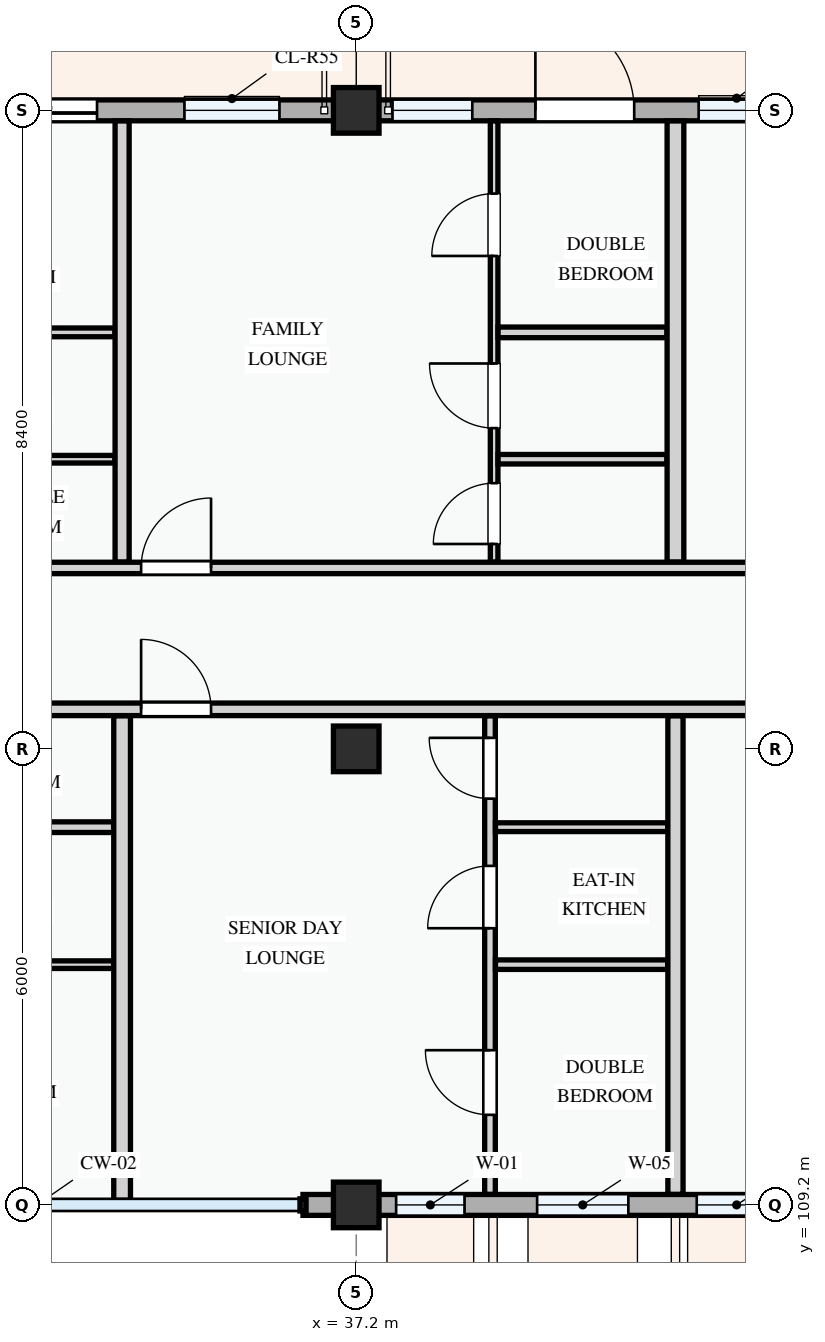
"""IFC4 building model, lengths in metres.
Left out: names, types, materials, properties, quantities, classifications, styles, units other than length and angle.
Written with IfcOpenShell. Run it as: python <this file> out.ifc"""

import sys

from ifc_helpers import new_model, si_unit, direction, frame, frame_2d, origin, origin_2d, place, context, subcontext, project, spatial, rectangle, extrude, element, fill, save


model = new_model("IFC4")
c1 = context("Model", 3, precision=1e-05, world=origin(), true_north=direction((0.0, 1.0)))
c2 = subcontext(c1, "Body", "Model", "MODEL_VIEW")
j1 = project(units=[si_unit("LENGTHUNIT", "METRE"), si_unit("PLANEANGLEUNIT", "RADIAN")], contexts=[c1])
p1 = place(None, origin())
s1 = spatial("IfcSite", under=j1, at=p1, CompositionType="ELEMENT")
p2 = place(p1, origin())
s2 = spatial("IfcBuilding", under=s1, at=p2, CompositionType="ELEMENT")
p3 = place(p2, frame((0.0, 0.0, 31.2)))
s3 = spatial("IfcBuildingStorey", under=s2, at=p3, CompositionType="ELEMENT", Elevation=31.2)
for number, where, z_axis, x_axis in (
    (1, (37.2, 109.2, 0.0), (0.0, 0.0, 1.0), (1.0, 0.0, 0.0)),
    (2, (37.2, 115.2, 0.0), (0.0, 0.0, 1.0), (1.0, 0.0, 0.0)),
    (3, (37.2, 123.6, 0.0), (0.0, 0.0, 1.0), (1.0, 0.0, 0.0)),
):
    element("IfcColumn", number, at=place(p3, frame(where, z_axis=z_axis, x_axis=x_axis)), inside=s3, PredefinedType="COLUMN", context=c2, shape_type="SweptSolid", body=[
        extrude(rectangle(XDim=0.6, YDim=0.6, at=origin_2d()), origin(), (0.0, 0.0, 1.0), 3.3),
    ])
p4 = place(p3, frame((36.5, 109.2, 0.0), z_axis=(0.0, 0.0, 1.0), x_axis=(1.0, 0.0, 0.0)))
e4 = element("IfcWall", 4, at=p4, inside=s3, PredefinedType="STANDARD", context=c2, shape_type="SweptSolid", body=[
    extrude(rectangle(XDim=0.7, YDim=0.275, at=frame_2d((0.35, 0.0))), origin(), (0.0, 0.0, 1.0), 2.375),
])
p5 = place(p3, frame((37.2, 109.2, 0.0), z_axis=(0.0, 0.0, 1.0), x_axis=(1.0, 0.0, 0.0)))
e5 = element("IfcWall", 5, at=p5, inside=s3, PredefinedType="STANDARD", context=c2, shape_type="SweptSolid", body=[
    extrude(rectangle(XDim=6.0, YDim=0.275, at=frame_2d((3.0, 0.0))), origin(), (0.0, 0.0, 1.0), 2.525),
])
p6 = place(p5, frame((0.525, 0.0, 0.78)))
e6 = element("IfcOpeningElement", 6, at=p6, cuts=e5, PredefinedType="OPENING", context=c2, shape_type="SweptSolid", body=[
    extrude(rectangle(XDim=0.9, YDim=1.2, at=frame_2d((0.45, 0.6))), frame((0.0, 0.147, 0.0), z_axis=(0.0, -1.0, 0.0), x_axis=(1.0, 0.0, 0.0)), (0.0, 0.0, 1.0), 0.295),
])
p7 = place(p5, frame((2.38, 0.0, 0.78)))
e7 = element("IfcOpeningElement", 7, at=p7, cuts=e5, PredefinedType="OPENING", context=c2, shape_type="SweptSolid", body=[
    extrude(rectangle(XDim=1.2, YDim=1.5, at=frame_2d((0.6, 0.75))), frame((0.0, 0.147, 0.0), z_axis=(0.0, -1.0, 0.0), x_axis=(1.0, 0.0, 0.0)), (0.0, 0.0, 1.0), 0.295),
])
p8 = place(p5, frame((4.48, 0.0, 0.78)))
e8 = element("IfcOpeningElement", 8, at=p8, cuts=e5, PredefinedType="OPENING", context=c2, shape_type="SweptSolid", body=[
    extrude(rectangle(XDim=1.05, YDim=1.2, at=frame_2d((0.525, 0.6))), frame((0.0, 0.147, 0.0), z_axis=(0.0, -1.0, 0.0), x_axis=(1.0, 0.0, 0.0)), (0.0, 0.0, 1.0), 0.295),
])
p9 = place(p3, frame((43.2, 123.6, 0.0), z_axis=(0.0, 0.0, 1.0), x_axis=(-1.0, 0.0, 0.0)))
e9 = element("IfcWall", 9, at=p9, inside=s3, PredefinedType="STANDARD", context=c2, shape_type="SweptSolid", body=[
    extrude(rectangle(XDim=6.0, YDim=0.275, at=frame_2d((3.0, 0.0))), origin(), (0.0, 0.0, 1.0), 2.525),
])
p10 = place(p9, frame((2.343, 0.0, 0.0)))
e10 = element("IfcOpeningElement", 10, at=p10, cuts=e9, PredefinedType="OPENING", context=c2, shape_type="SweptSolid", body=[
    extrude(rectangle(XDim=1.3, YDim=2.15, at=frame_2d((0.65, 1.075))), frame((0.0, 0.147, 0.0), z_axis=(0.0, -1.0, 0.0), x_axis=(1.0, 0.0, 0.0)), (0.0, 0.0, 1.0), 0.295),
])
p11 = place(p9, frame((0.495, 0.0, 0.78)))
e11 = element("IfcOpeningElement", 11, at=p11, cuts=e9, PredefinedType="OPENING", context=c2, shape_type="SweptSolid", body=[
    extrude(rectangle(XDim=1.0, YDim=1.25, at=frame_2d((0.5, 0.625))), frame((0.0, 0.147, 0.0), z_axis=(0.0, -1.0, 0.0), x_axis=(1.0, 0.0, 0.0)), (0.0, 0.0, 1.0), 0.295),
])
p12 = place(p9, frame((4.473, 0.0, 0.78)))
e12 = element("IfcOpeningElement", 12, at=p12, cuts=e9, PredefinedType="OPENING", context=c2, shape_type="SweptSolid", body=[
    extrude(rectangle(XDim=1.05, YDim=1.2, at=frame_2d((0.525, 0.6))), frame((0.0, 0.147, 0.0), z_axis=(0.0, -1.0, 0.0), x_axis=(1.0, 0.0, 0.0)), (0.0, 0.0, 1.0), 0.295),
])
p13 = place(p3, frame((37.2, 123.6, 0.0), z_axis=(0.0, 0.0, 1.0), x_axis=(-1.0, 0.0, 0.0)))
e13 = element("IfcWall", 13, at=p13, inside=s3, PredefinedType="STANDARD", context=c2, shape_type="SweptSolid", body=[
    extrude(rectangle(XDim=8.4, YDim=0.275, at=frame_2d((4.2, 0.0))), origin(), (0.0, 0.0, 1.0), 2.375),
])
p14 = place(p13, frame((3.41, 0.0, 0.0)))
e14 = element("IfcOpeningElement", 14, at=p14, cuts=e13, PredefinedType="OPENING", context=c2, shape_type="SweptSolid", body=[
    extrude(rectangle(XDim=1.4, YDim=2.2, at=frame_2d((0.7, 1.1))), frame((0.0, 0.147, 0.0), z_axis=(0.0, -1.0, 0.0), x_axis=(1.0, 0.0, 0.0)), (0.0, 0.0, 1.0), 0.295),
])
p15 = place(p13, frame((1.01, 0.0, 0.78)))
e15 = element("IfcOpeningElement", 15, at=p15, cuts=e13, PredefinedType="OPENING", context=c2, shape_type="SweptSolid", body=[
    extrude(rectangle(XDim=1.25, YDim=1.3, at=frame_2d((0.625, 0.65))), frame((0.0, 0.147, 0.0), z_axis=(0.0, -1.0, 0.0), x_axis=(1.0, 0.0, 0.0)), (0.0, 0.0, 1.0), 0.295),
])
p16 = place(p13, frame((5.227, 0.0, 0.78)))
e16 = element("IfcOpeningElement", 16, at=p16, cuts=e13, PredefinedType="OPENING", context=c2, shape_type="SweptSolid", body=[
    extrude(rectangle(XDim=1.05, YDim=1.2, at=frame_2d((0.525, 0.6))), frame((0.0, 0.147, 0.0), z_axis=(0.0, -1.0, 0.0), x_axis=(1.0, 0.0, 0.0)), (0.0, 0.0, 1.0), 0.295),
])
p17 = place(p13, frame((6.977, 0.0, 0.78)))
e17 = element("IfcOpeningElement", 17, at=p17, cuts=e13, PredefinedType="OPENING", context=c2, shape_type="SweptSolid", body=[
    extrude(rectangle(XDim=0.9, YDim=1.2, at=frame_2d((0.45, 0.6))), frame((0.0, 0.147, 0.0), z_axis=(0.0, -1.0, 0.0), x_axis=(1.0, 0.0, 0.0)), (0.0, 0.0, 1.0), 0.295),
])
p18 = place(p3, frame((30.594, 112.361, 0.0), z_axis=(0.0, 0.0, 1.0), x_axis=(1.0, 0.0, 0.0)))
e18 = element("IfcWall", 18, at=p18, inside=s3, PredefinedType="PARTITIONING", context=c2, shape_type="SweptSolid", body=[
    extrude(rectangle(XDim=3.414, YDim=0.1, at=frame_2d((1.707, 0.0))), origin(), (0.0, 0.0, 1.0), 3.0),
])
p19 = place(p3, frame((30.594, 114.17, 0.0), z_axis=(0.0, 0.0, 1.0), x_axis=(1.0, 0.0, 0.0)))
e19 = element("IfcWall", 19, at=p19, inside=s3, PredefinedType="PARTITIONING", context=c2, shape_type="SweptSolid", body=[
    extrude(rectangle(XDim=3.414, YDim=0.14, at=frame_2d((1.707, 0.0))), origin(), (0.0, 0.0, 1.0), 3.0),
])
p20 = place(p3, frame((30.62, 120.679, 0.0), z_axis=(0.0, 0.0, 1.0), x_axis=(1.0, 0.0, 0.0)))
e20 = element("IfcWall", 20, at=p20, inside=s3, PredefinedType="PARTITIONING", context=c2, shape_type="SweptSolid", body=[
    extrude(rectangle(XDim=3.405, YDim=0.115, at=frame_2d((1.703, 0.0))), origin(), (0.0, 0.0, 1.0), 3.0),
])
p21 = place(p3, frame((30.62, 119.01, 0.0), z_axis=(0.0, 0.0, 1.0), x_axis=(1.0, 0.0, 0.0)))
e21 = element("IfcWall", 21, at=p21, inside=s3, PredefinedType="PARTITIONING", context=c2, shape_type="SweptSolid", body=[
    extrude(rectangle(XDim=3.405, YDim=0.1, at=frame_2d((1.703, 0.0))), origin(), (0.0, 0.0, 1.0), 3.0),
])
p22 = place(p3, frame((38.96, 109.34, 0.0), z_axis=(0.0, 0.0, 1.0), x_axis=(0.0, 1.0, 0.0)))
e22 = element("IfcWall", 22, at=p22, inside=s3, PredefinedType="PARTITIONING", context=c2, shape_type="SweptSolid", body=[
    extrude(rectangle(XDim=6.296, YDim=0.14, at=frame_2d((3.148, 0.0))), origin(), (0.0, 0.0, 1.0), 3.0),
])
p23 = place(p22, frame((1.046, 0.0, 0.0)))
e23 = element("IfcOpeningElement", 23, at=p23, cuts=e22, PredefinedType="OPENING", context=c2, shape_type="SweptSolid", body=[
    extrude(rectangle(XDim=0.85, YDim=2.1, at=frame_2d((0.425, 1.05))), frame((0.0, 0.08, 0.0), z_axis=(0.0, -1.0, 0.0), x_axis=(1.0, 0.0, 0.0)), (0.0, 0.0, 1.0), 0.16),
])
p24 = place(p22, frame((3.501, 0.0, 0.0)))
e24 = element("IfcOpeningElement", 24, at=p24, cuts=e22, PredefinedType="OPENING", context=c2, shape_type="SweptSolid", body=[
    extrude(rectangle(XDim=0.82, YDim=2.08, at=frame_2d((0.41, 1.04))), frame((0.0, 0.08, 0.0), z_axis=(0.0, -1.0, 0.0), x_axis=(1.0, 0.0, 0.0)), (0.0, 0.0, 1.0), 0.16),
])
p25 = place(p22, frame((5.205, 0.0, 0.0)))
e25 = element("IfcOpeningElement", 25, at=p25, cuts=e22, PredefinedType="OPENING", context=c2, shape_type="SweptSolid", body=[
    extrude(rectangle(XDim=0.8, YDim=2.1, at=frame_2d((0.4, 1.05))), frame((0.0, 0.08, 0.0), z_axis=(0.0, -1.0, 0.0), x_axis=(1.0, 0.0, 0.0)), (0.0, 0.0, 1.0), 0.16),
])
p26 = place(p3, frame((39.032, 112.361, 0.0), z_axis=(0.0, 0.0, 1.0), x_axis=(1.0, 0.0, 0.0)))
e26 = element("IfcWall", 26, at=p26, inside=s3, PredefinedType="PARTITIONING", context=c2, shape_type="SweptSolid", body=[
    extrude(rectangle(XDim=2.266, YDim=0.125, at=frame_2d((1.133, 0.0))), origin(), (0.0, 0.0, 1.0), 3.0),
])
p27 = place(p3, frame((39.032, 114.17, 0.0), z_axis=(0.0, 0.0, 1.0), x_axis=(1.0, 0.0, 0.0)))
e27 = element("IfcWall", 27, at=p27, inside=s3, PredefinedType="PARTITIONING", context=c2, shape_type="SweptSolid", body=[
    extrude(rectangle(XDim=2.266, YDim=0.115, at=frame_2d((1.133, 0.0))), origin(), (0.0, 0.0, 1.0), 3.0),
])
p28 = place(p3, frame((39.014, 117.657, 0.0), z_axis=(0.0, 0.0, 1.0), x_axis=(0.0, 1.0, 0.0)))
e28 = element("IfcWall", 28, at=p28, inside=s3, PredefinedType="PARTITIONING", context=c2, shape_type="SweptSolid", body=[
    extrude(rectangle(XDim=5.803, YDim=0.1, at=frame_2d((2.902, 0.0))), origin(), (0.0, 0.0, 1.0), 3.0),
])
p29 = place(p28, frame((0.238, 0.0, 0.0)))
e29 = element("IfcOpeningElement", 29, at=p29, cuts=e28, PredefinedType="OPENING", context=c2, shape_type="SweptSolid", body=[
    extrude(rectangle(XDim=0.8, YDim=2.1, at=frame_2d((0.4, 1.05))), frame((0.0, 0.06, 0.0), z_axis=(0.0, -1.0, 0.0), x_axis=(1.0, 0.0, 0.0)), (0.0, 0.0, 1.0), 0.12),
])
p30 = place(p28, frame((1.763, 0.0, 0.0)))
e30 = element("IfcOpeningElement", 30, at=p30, cuts=e28, PredefinedType="OPENING", context=c2, shape_type="SweptSolid", body=[
    extrude(rectangle(XDim=0.85, YDim=2.1, at=frame_2d((0.425, 1.05))), frame((0.0, 0.06, 0.0), z_axis=(0.0, -1.0, 0.0), x_axis=(1.0, 0.0, 0.0)), (0.0, 0.0, 1.0), 0.12),
])
p31 = place(p28, frame((4.028, 0.0, 0.0)))
e31 = element("IfcOpeningElement", 31, at=p31, cuts=e28, PredefinedType="OPENING", context=c2, shape_type="SweptSolid", body=[
    extrude(rectangle(XDim=0.82, YDim=2.08, at=frame_2d((0.41, 1.04))), frame((0.0, 0.06, 0.0), z_axis=(0.0, -1.0, 0.0), x_axis=(1.0, 0.0, 0.0)), (0.0, 0.0, 1.0), 0.12),
])
p32 = place(p3, frame((39.066, 120.679, 0.0), z_axis=(0.0, 0.0, 1.0), x_axis=(1.0, 0.0, 0.0)))
e32 = element("IfcWall", 32, at=p32, inside=s3, PredefinedType="PARTITIONING", context=c2, shape_type="SweptSolid", body=[
    extrude(rectangle(XDim=2.222, YDim=0.14, at=frame_2d((1.111, 0.0))), origin(), (0.0, 0.0, 1.0), 3.0),
])
p33 = place(p3, frame((39.066, 119.01, 0.0), z_axis=(0.0, 0.0, 1.0), x_axis=(1.0, 0.0, 0.0)))
e33 = element("IfcWall", 33, at=p33, inside=s3, PredefinedType="PARTITIONING", context=c2, shape_type="SweptSolid", body=[
    extrude(rectangle(XDim=2.222, YDim=0.125, at=frame_2d((1.111, 0.0))), origin(), (0.0, 0.0, 1.0), 3.0),
])
p34 = place(p3, frame((34.12, 109.26, 0.0), z_axis=(0.0, 0.0, 1.0), x_axis=(0.0, 1.0, 0.0)))
e34 = element("IfcWall", 34, at=p34, inside=s3, PredefinedType="PARTITIONING", context=c2, shape_type="SweptSolid", body=[
    extrude(rectangle(XDim=6.375, YDim=0.22, at=frame_2d((3.188, 0.0))), origin(), (0.0, 0.0, 1.0), 3.0),
])
p35 = place(p3, frame((34.12, 117.657, 0.0), z_axis=(0.0, 0.0, 1.0), x_axis=(0.0, 1.0, 0.0)))
e35 = element("IfcWall", 35, at=p35, inside=s3, PredefinedType="PARTITIONING", context=c2, shape_type="SweptSolid", body=[
    extrude(rectangle(XDim=5.803, YDim=0.185, at=frame_2d((2.902, 0.0))), origin(), (0.0, 0.0, 1.0), 3.0),
])
p36 = place(p3, frame((41.4, 109.34, 0.0), z_axis=(0.0, 0.0, 1.0), x_axis=(0.0, 1.0, 0.0)))
e36 = element("IfcWall", 36, at=p36, inside=s3, PredefinedType="PARTITIONING", context=c2, shape_type="SweptSolid", body=[
    extrude(rectangle(XDim=6.296, YDim=0.2, at=frame_2d((3.148, 0.0))), origin(), (0.0, 0.0, 1.0), 3.0),
])
p37 = place(p3, frame((41.4, 117.657, 0.0), z_axis=(0.0, 0.0, 1.0), x_axis=(0.0, 1.0, 0.0)))
e37 = element("IfcWall", 37, at=p37, inside=s3, PredefinedType="PARTITIONING", context=c2, shape_type="SweptSolid", body=[
    extrude(rectangle(XDim=5.803, YDim=0.22, at=frame_2d((2.902, 0.0))), origin(), (0.0, 0.0, 1.0), 3.0),
])
p38 = place(p3, frame((25.15, 115.72, 0.0), z_axis=(0.0, 0.0, 1.0), x_axis=(1.0, 0.0, 0.0)))
e38 = element("IfcWall", 38, at=p38, inside=s3, PredefinedType="PARTITIONING", context=c2, shape_type="SweptSolid", body=[
    extrude(rectangle(XDim=26.311, YDim=0.165, at=frame_2d((13.155, 0.0))), origin(), (0.0, 0.0, 1.0), 3.0),
])
p39 = place(p38, frame((0.25, 0.0, 0.0)))
e39 = element("IfcOpeningElement", 39, at=p39, cuts=e38, PredefinedType="OPENING", context=c2, shape_type="SweptSolid", body=[
    extrude(rectangle(XDim=0.92, YDim=2.1, at=frame_2d((0.46, 1.05))), frame((0.0, 0.093, 0.0), z_axis=(0.0, -1.0, 0.0), x_axis=(1.0, 0.0, 0.0)), (0.0, 0.0, 1.0), 0.185),
])
p40 = place(p38, frame((9.22, 0.0, 0.0)))
e40 = element("IfcOpeningElement", 40, at=p40, cuts=e38, PredefinedType="OPENING", context=c2, shape_type="SweptSolid", body=[
    extrude(rectangle(XDim=0.92, YDim=2.1, at=frame_2d((0.46, 1.05))), frame((0.0, 0.093, 0.0), z_axis=(0.0, -1.0, 0.0), x_axis=(1.0, 0.0, 0.0)), (0.0, 0.0, 1.0), 0.185),
])
p41 = place(p38, frame((20.11, 0.0, 0.0)))
e41 = element("IfcOpeningElement", 41, at=p41, cuts=e38, PredefinedType="OPENING", context=c2, shape_type="SweptSolid", body=[
    extrude(rectangle(XDim=0.96, YDim=2.12, at=frame_2d((0.48, 1.06))), frame((0.0, 0.093, 0.0), z_axis=(0.0, -1.0, 0.0), x_axis=(1.0, 0.0, 0.0)), (0.0, 0.0, 1.0), 0.185),
])
p42 = place(p3, frame((22.66, 117.58, 0.0), z_axis=(0.0, 0.0, 1.0), x_axis=(1.0, 0.0, 0.0)))
e42 = element("IfcWall", 42, at=p42, inside=s3, PredefinedType="PARTITIONING", context=c2, shape_type="SweptSolid", body=[
    extrude(rectangle(XDim=28.88, YDim=0.15, at=frame_2d((14.44, 0.0))), origin(), (0.0, 0.0, 1.0), 3.0),
])
p43 = place(p42, frame((2.74, 0.0, 0.0)))
e43 = element("IfcOpeningElement", 43, at=p43, cuts=e42, PredefinedType="OPENING", context=c2, shape_type="SweptSolid", body=[
    extrude(rectangle(XDim=0.92, YDim=2.1, at=frame_2d((0.46, 1.05))), frame((0.0, 0.085, 0.0), z_axis=(0.0, -1.0, 0.0), x_axis=(1.0, 0.0, 0.0)), (0.0, 0.0, 1.0), 0.17),
])
p44 = place(p42, frame((11.71, 0.0, 0.0)))
e44 = element("IfcOpeningElement", 44, at=p44, cuts=e42, PredefinedType="OPENING", context=c2, shape_type="SweptSolid", body=[
    extrude(rectangle(XDim=0.92, YDim=2.1, at=frame_2d((0.46, 1.05))), frame((0.0, 0.085, 0.0), z_axis=(0.0, -1.0, 0.0), x_axis=(1.0, 0.0, 0.0)), (0.0, 0.0, 1.0), 0.17),
])
p45 = place(p42, frame((22.397, 0.0, 0.0)))
e45 = element("IfcOpeningElement", 45, at=p45, cuts=e42, PredefinedType="OPENING", context=c2, shape_type="SweptSolid", body=[
    extrude(rectangle(XDim=0.92, YDim=2.1, at=frame_2d((0.46, 1.05))), frame((0.0, 0.085, 0.0), z_axis=(0.0, -1.0, 0.0), x_axis=(1.0, 0.0, 0.0)), (0.0, 0.0, 1.0), 0.17),
])
p46 = place(p6, origin())
e46 = element("IfcWindow", 46, at=p46, inside=s3, PartitioningType="SINGLE_PANEL", PredefinedType="WINDOW", context=c2, shape_type="SweptSolid", body=[
    extrude(rectangle(XDim=0.9, YDim=1.2, at=frame_2d((0.45, 0.6))), frame((0.0, 0.03, 0.0), z_axis=(0.0, -1.0, 0.0), x_axis=(1.0, 0.0, 0.0)), (0.0, 0.0, 1.0), 0.06),
])
fill(e6, e46)
p47 = place(p7, origin())
e47 = element("IfcWindow", 47, at=p47, inside=s3, PartitioningType="SINGLE_PANEL", PredefinedType="WINDOW", context=c2, shape_type="SweptSolid", body=[
    extrude(rectangle(XDim=1.2, YDim=1.5, at=frame_2d((0.6, 0.75))), frame((0.0, 0.03, 0.0), z_axis=(0.0, -1.0, 0.0), x_axis=(1.0, 0.0, 0.0)), (0.0, 0.0, 1.0), 0.06),
])
fill(e7, e47)
p48 = place(p8, origin())
e48 = element("IfcWindow", 48, at=p48, inside=s3, PartitioningType="SINGLE_PANEL", PredefinedType="WINDOW", context=c2, shape_type="SweptSolid", body=[
    extrude(rectangle(XDim=1.05, YDim=1.2, at=frame_2d((0.525, 0.6))), frame((0.0, 0.03, 0.0), z_axis=(0.0, -1.0, 0.0), x_axis=(1.0, 0.0, 0.0)), (0.0, 0.0, 1.0), 0.06),
])
fill(e8, e48)
p49 = place(p10, frame((1.3, 0.0, 0.0), z_axis=(0.0, 0.0, 1.0), x_axis=(-1.0, 0.0, 0.0)))
e49 = element("IfcDoor", 49, at=p49, inside=s3, OperationType="SINGLE_SWING_LEFT", PredefinedType="DOOR", context=c2, shape_type="SweptSolid", body=[
    extrude(rectangle(XDim=1.3, YDim=2.15, at=frame_2d((0.65, 1.075))), frame((0.0, 0.025, 0.0), z_axis=(0.0, -1.0, 0.0), x_axis=(1.0, 0.0, 0.0)), (0.0, 0.0, 1.0), 0.05),
])
fill(e10, e49)
p50 = place(p11, origin())
e50 = element("IfcWindow", 50, at=p50, inside=s3, PartitioningType="SINGLE_PANEL", PredefinedType="WINDOW", context=c2, shape_type="SweptSolid", body=[
    extrude(rectangle(XDim=1.0, YDim=1.25, at=frame_2d((0.5, 0.625))), frame((0.0, 0.03, 0.0), z_axis=(0.0, -1.0, 0.0), x_axis=(1.0, 0.0, 0.0)), (0.0, 0.0, 1.0), 0.06),
])
fill(e11, e50)
p51 = place(p12, origin())
e51 = element("IfcWindow", 51, at=p51, inside=s3, PartitioningType="SINGLE_PANEL", PredefinedType="WINDOW", context=c2, shape_type="SweptSolid", body=[
    extrude(rectangle(XDim=1.05, YDim=1.2, at=frame_2d((0.525, 0.6))), frame((0.0, 0.03, 0.0), z_axis=(0.0, -1.0, 0.0), x_axis=(1.0, 0.0, 0.0)), (0.0, 0.0, 1.0), 0.06),
])
fill(e12, e51)
p52 = place(p14, frame((1.4, 0.0, 0.0), z_axis=(0.0, 0.0, 1.0), x_axis=(-1.0, 0.0, 0.0)))
e52 = element("IfcDoor", 52, at=p52, inside=s3, OperationType="SLIDING_TO_LEFT", PredefinedType="DOOR", context=c2, shape_type="SweptSolid", body=[
    extrude(rectangle(XDim=1.4, YDim=2.2, at=frame_2d((0.7, 1.1))), frame((0.0, 0.025, 0.0), z_axis=(0.0, -1.0, 0.0), x_axis=(1.0, 0.0, 0.0)), (0.0, 0.0, 1.0), 0.05),
])
fill(e14, e52)
p53 = place(p15, origin())
e53 = element("IfcWindow", 53, at=p53, inside=s3, PartitioningType="SINGLE_PANEL", PredefinedType="WINDOW", context=c2, shape_type="SweptSolid", body=[
    extrude(rectangle(XDim=1.25, YDim=1.3, at=frame_2d((0.625, 0.65))), frame((0.0, 0.03, 0.0), z_axis=(0.0, -1.0, 0.0), x_axis=(1.0, 0.0, 0.0)), (0.0, 0.0, 1.0), 0.06),
])
fill(e15, e53)
p54 = place(p23, origin())
e54 = element("IfcDoor", 54, at=p54, inside=s3, OperationType="SINGLE_SWING_RIGHT", PredefinedType="DOOR", context=c2, shape_type="SweptSolid", body=[
    extrude(rectangle(XDim=0.85, YDim=2.1, at=frame_2d((0.425, 1.05))), frame((0.0, 0.025, 0.0), z_axis=(0.0, -1.0, 0.0), x_axis=(1.0, 0.0, 0.0)), (0.0, 0.0, 1.0), 0.05),
])
fill(e23, e54)
p55 = place(p24, origin())
e55 = element("IfcDoor", 55, at=p55, inside=s3, OperationType="SINGLE_SWING_LEFT", PredefinedType="DOOR", context=c2, shape_type="SweptSolid", body=[
    extrude(rectangle(XDim=0.82, YDim=2.08, at=frame_2d((0.41, 1.04))), frame((0.0, 0.025, 0.0), z_axis=(0.0, -1.0, 0.0), x_axis=(1.0, 0.0, 0.0)), (0.0, 0.0, 1.0), 0.05),
])
fill(e24, e55)
p56 = place(p25, origin())
e56 = element("IfcDoor", 56, at=p56, inside=s3, OperationType="SINGLE_SWING_RIGHT", PredefinedType="DOOR", context=c2, shape_type="SweptSolid", body=[
    extrude(rectangle(XDim=0.8, YDim=2.1, at=frame_2d((0.4, 1.05))), frame((0.0, 0.025, 0.0), z_axis=(0.0, -1.0, 0.0), x_axis=(1.0, 0.0, 0.0)), (0.0, 0.0, 1.0), 0.05),
])
fill(e25, e56)
p57 = place(p29, origin())
e57 = element("IfcDoor", 57, at=p57, inside=s3, OperationType="SINGLE_SWING_LEFT", PredefinedType="DOOR", context=c2, shape_type="SweptSolid", body=[
    extrude(rectangle(XDim=0.8, YDim=2.1, at=frame_2d((0.4, 1.05))), frame((0.0, 0.025, 0.0), z_axis=(0.0, -1.0, 0.0), x_axis=(1.0, 0.0, 0.0)), (0.0, 0.0, 1.0), 0.05),
])
fill(e29, e57)
p58 = place(p30, origin())
e58 = element("IfcDoor", 58, at=p58, inside=s3, OperationType="SINGLE_SWING_RIGHT", PredefinedType="DOOR", context=c2, shape_type="SweptSolid", body=[
    extrude(rectangle(XDim=0.85, YDim=2.1, at=frame_2d((0.425, 1.05))), frame((0.0, 0.025, 0.0), z_axis=(0.0, -1.0, 0.0), x_axis=(1.0, 0.0, 0.0)), (0.0, 0.0, 1.0), 0.05),
])
fill(e30, e58)
p59 = place(p31, origin())
e59 = element("IfcDoor", 59, at=p59, inside=s3, OperationType="SINGLE_SWING_LEFT", PredefinedType="DOOR", context=c2, shape_type="SweptSolid", body=[
    extrude(rectangle(XDim=0.82, YDim=2.08, at=frame_2d((0.41, 1.04))), frame((0.0, 0.025, 0.0), z_axis=(0.0, -1.0, 0.0), x_axis=(1.0, 0.0, 0.0)), (0.0, 0.0, 1.0), 0.05),
])
fill(e31, e59)
p60 = place(p40, origin())
e60 = element("IfcDoor", 60, at=p60, inside=s3, OperationType="SINGLE_SWING_LEFT", PredefinedType="DOOR", context=c2, shape_type="SweptSolid", body=[
    extrude(rectangle(XDim=0.92, YDim=2.1, at=frame_2d((0.46, 1.05))), frame((0.0, 0.025, 0.0), z_axis=(0.0, -1.0, 0.0), x_axis=(1.0, 0.0, 0.0)), (0.0, 0.0, 1.0), 0.05),
])
fill(e40, e60)
p61 = place(p44, origin())
e61 = element("IfcDoor", 61, at=p61, inside=s3, OperationType="SINGLE_SWING_RIGHT", PredefinedType="DOOR", context=c2, shape_type="SweptSolid", body=[
    extrude(rectangle(XDim=0.92, YDim=2.1, at=frame_2d((0.46, 1.05))), frame((0.0, 0.025, 0.0), z_axis=(0.0, -1.0, 0.0), x_axis=(1.0, 0.0, 0.0)), (0.0, 0.0, 1.0), 0.05),
])
fill(e44, e61)
save(model, sys.argv[1])
